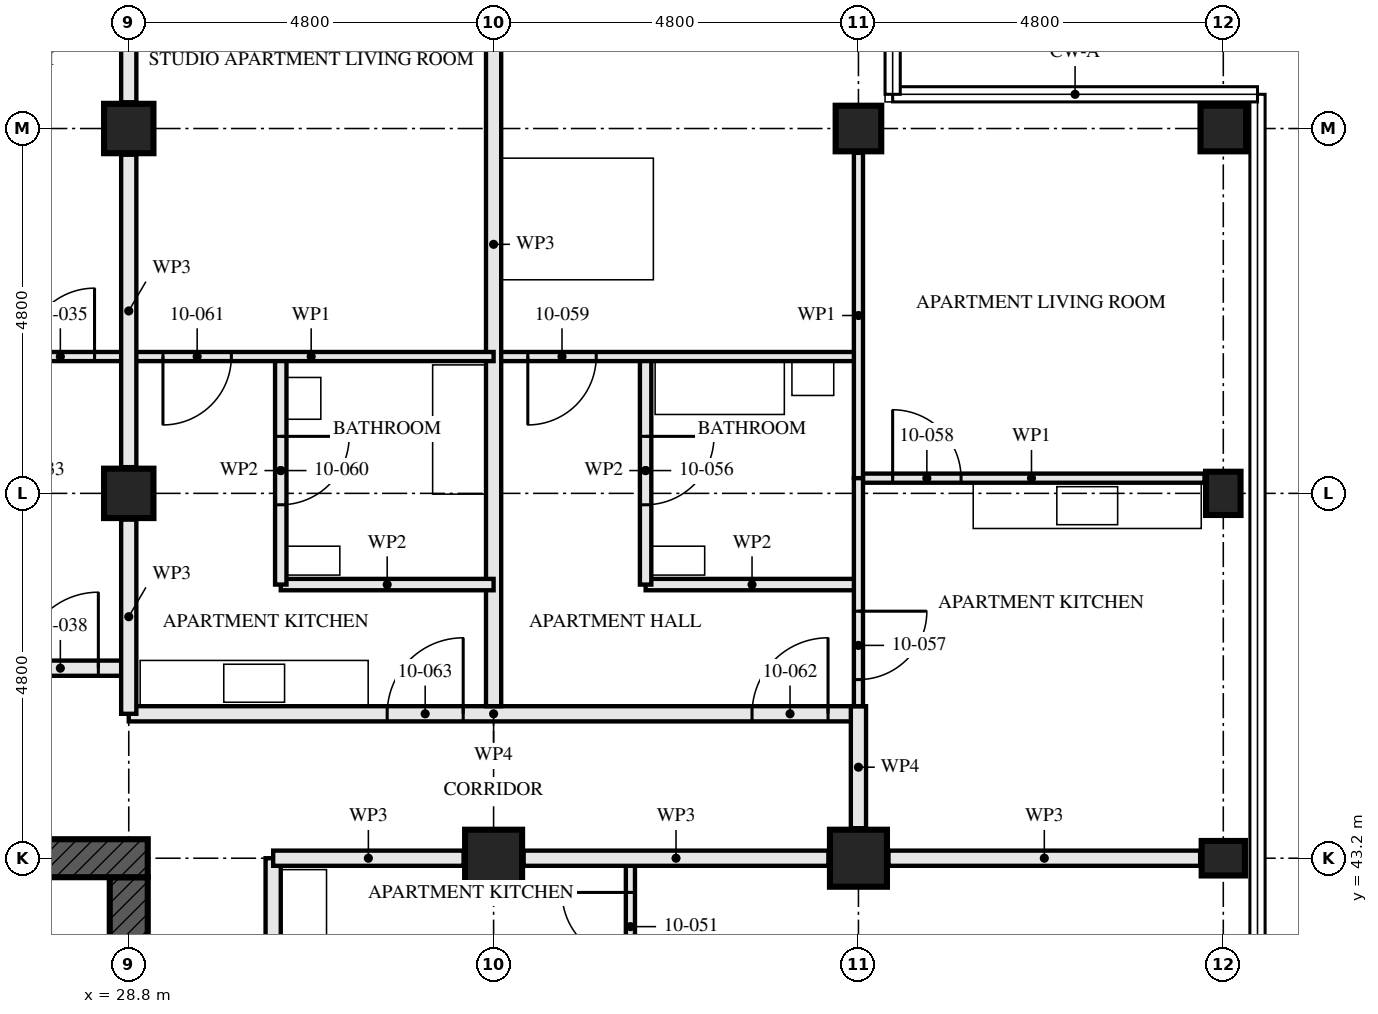
"""IFC4 building model, lengths in metres.
Left out: names, types, materials, properties, quantities, classifications, styles, units other than length and angle.
Written with IfcOpenShell. Run it as: python <this file> out.ifc"""

import sys

from ifc_helpers import new_model, si_unit, direction, frame, frame_2d, origin, origin_2d, place, context, subcontext, project, spatial, rectangle, hollow_rectangle, i_section, extrude, element, fill, save


model = new_model("IFC4")
c1 = context("Model", 3, precision=1e-05, world=origin(), true_north=direction((0.0, 1.0)))
c2 = subcontext(c1, "Body", "Model", "MODEL_VIEW")
j1 = project(units=[si_unit("LENGTHUNIT", "METRE"), si_unit("PLANEANGLEUNIT", "RADIAN")], contexts=[c1])
p1 = place(None, origin())
s1 = spatial("IfcSite", under=j1, at=p1, CompositionType="ELEMENT")
p2 = place(p1, origin())
s2 = spatial("IfcBuilding", under=s1, at=p2, CompositionType="ELEMENT")
p3 = place(p2, frame((0.0, 0.0, 41.0)))
s3 = spatial("IfcBuildingStorey", under=s2, at=p3, CompositionType="ELEMENT", Elevation=41.0)
for number, where, z_axis, x_axis in (
    (1, (28.8, 48.0, 0.0), (0.0, 0.0, 1.0), (1.0, 0.0, 0.0)),
    (2, (28.8, 52.8, 0.0), (0.0, 0.0, 1.0), (1.0, 0.0, 0.0)),
):
    element("IfcColumn", number, at=place(p3, frame(where, z_axis=z_axis, x_axis=x_axis)), inside=s3, PredefinedType="COLUMN", context=c2, shape_type="SweptSolid", body=[
        extrude(hollow_rectangle(XDim=0.65, YDim=0.65, WallThickness=0.05, at=origin_2d()), origin(), (0.0, 0.0, 1.0), 3.5),
    ])
for number, where, z_axis, x_axis in (
    (3, (33.6, 43.2, 0.0), (0.0, 0.0, 1.0), (0.0, 1.0, 0.0)),
    (4, (38.4, 43.2, 0.0), (0.0, 0.0, 1.0), (0.0, 1.0, 0.0)),
):
    element("IfcColumn", number, at=place(p3, frame(where, z_axis=z_axis, x_axis=x_axis)), inside=s3, PredefinedType="COLUMN", context=c2, shape_type="SweptSolid", body=[
        extrude(hollow_rectangle(XDim=0.75, YDim=0.75, WallThickness=0.08, at=origin_2d()), origin(), (0.0, 0.0, 1.0), 3.5),
    ])
p4 = place(p3, frame((38.4, 52.8, 0.0), z_axis=(0.0, 0.0, 1.0), x_axis=(0.0, 1.0, 0.0)))
e5 = element("IfcColumn", 5, at=p4, inside=s3, PredefinedType="COLUMN", context=c2, shape_type="SweptSolid", body=[
    extrude(hollow_rectangle(XDim=0.6, YDim=0.6, WallThickness=0.05, at=origin_2d()), origin(), (0.0, 0.0, 1.0), 3.5),
])
for number, where, z_axis, x_axis in (
    (6, (43.2, 43.2, 0.0), (0.0, 0.0, 1.0), (0.0, 1.0, 0.0)),
    (7, (43.2, 48.0, 0.0), (0.0, 0.0, 1.0), (1.0, 0.0, 0.0)),
):
    element("IfcColumn", number, at=place(p3, frame(where, z_axis=z_axis, x_axis=x_axis)), inside=s3, PredefinedType="COLUMN", context=c2, shape_type="SweptSolid", body=[
        extrude(i_section(OverallWidth=0.454, OverallDepth=0.569, WebThickness=0.078, FlangeThickness=0.125, FilletRadius=0.015, at=origin_2d()), origin(), (0.0, 0.0, 1.0), 3.5),
    ])
p5 = place(p3, frame((43.2, 52.8, 0.0), z_axis=(0.0, 0.0, 1.0), x_axis=(0.0, 1.0, 0.0)))
e8 = element("IfcColumn", 8, at=p5, inside=s3, PredefinedType="COLUMN", context=c2, shape_type="SweptSolid", body=[
    extrude(hollow_rectangle(XDim=0.6, YDim=0.6, WallThickness=0.05, at=origin_2d()), origin(), (0.0, 0.0, 1.0), 3.5),
])
p6 = place(p3, frame((29.05, 43.2, -0.17), z_axis=(0.0, 0.0, 1.0), x_axis=(-1.0, 0.0, 0.0)))
e9 = element("IfcWall", 9, at=p6, inside=s3, PredefinedType="SHEAR", context=c2, shape_type="SweptSolid", body=[
    extrude(rectangle(XDim=14.9, YDim=0.5, at=frame_2d((7.45, 0.0))), origin(), (0.0, 0.0, 1.0), 3.5),
])
p7 = place(p6, frame((6.85, 0.0, 0.17)))
e10 = element("IfcOpeningElement", 10, at=p7, cuts=e9, PredefinedType="OPENING", context=c2, shape_type="SweptSolid", body=[
    extrude(rectangle(XDim=1.2, YDim=2.1, at=frame_2d((0.6, 1.05))), frame((0.0, 0.26, 0.0), z_axis=(0.0, -1.0, 0.0), x_axis=(1.0, 0.0, 0.0)), (0.0, 0.0, 1.0), 0.521),
])
p8 = place(p3, frame((28.8, 29.05, -0.17), z_axis=(0.0, 0.0, 1.0), x_axis=(0.0, 1.0, 0.0)))
e11 = element("IfcWall", 11, at=p8, inside=s3, PredefinedType="SHEAR", context=c2, shape_type="SweptSolid", body=[
    extrude(rectangle(XDim=13.9, YDim=0.5, at=frame_2d((6.95, 0.0))), origin(), (0.0, 0.0, 1.0), 3.5),
])
p9 = place(p8, frame((6.35, 0.0, 0.17)))
e12 = element("IfcOpeningElement", 12, at=p9, cuts=e11, PredefinedType="OPENING", context=c2, shape_type="SweptSolid", body=[
    extrude(rectangle(XDim=1.2, YDim=2.1, at=frame_2d((0.6, 1.05))), frame((0.0, 0.26, 0.0), z_axis=(0.0, -1.0, 0.0), x_axis=(1.0, 0.0, 0.0)), (0.0, 0.0, 1.0), 0.521),
])
p10 = place(p3, frame((28.8, 49.8, 0.0), z_axis=(0.0, 0.0, 1.0), x_axis=(-1.0, 0.0, 0.0)))
e13 = element("IfcWall", 13, at=p10, inside=s3, PredefinedType="PARTITIONING", context=c2, shape_type="SweptSolid", body=[
    extrude(rectangle(XDim=4.8, YDim=0.12, at=frame_2d((2.4, 0.0))), origin(), (0.0, 0.0, 1.0), 3.33),
])
p11 = place(p10, frame((0.45, 0.0, 0.0)))
e14 = element("IfcOpeningElement", 14, at=p11, cuts=e13, PredefinedType="OPENING", context=c2, shape_type="SweptSolid", body=[
    extrude(rectangle(XDim=0.9, YDim=2.1, at=frame_2d((0.45, 1.05))), frame((0.0, 0.071, 0.0), z_axis=(0.0, -1.0, 0.0), x_axis=(1.0, 0.0, 0.0)), (0.0, 0.0, 1.0), 0.141),
])
p12 = place(p3, frame((28.8, 45.7, 0.0), z_axis=(0.0, 0.0, 1.0), x_axis=(-1.0, 0.0, 0.0)))
e15 = element("IfcWall", 15, at=p12, inside=s3, PredefinedType="PARTITIONING", context=c2, shape_type="SweptSolid", body=[
    extrude(rectangle(XDim=14.4, YDim=0.2, at=frame_2d((7.2, 0.0))), origin(), (0.0, 0.0, 1.0), 3.33),
])
p13 = place(p12, frame((0.4, 0.0, 0.0)))
e16 = element("IfcOpeningElement", 16, at=p13, cuts=e15, PredefinedType="OPENING", context=c2, shape_type="SweptSolid", body=[
    extrude(rectangle(XDim=1.0, YDim=2.1, at=frame_2d((0.5, 1.05))), frame((0.0, 0.111, 0.0), z_axis=(0.0, -1.0, 0.0), x_axis=(1.0, 0.0, 0.0)), (0.0, 0.0, 1.0), 0.221),
])
p14 = place(p3, frame((35.4, 38.4, 0.0), z_axis=(0.0, 0.0, 1.0), x_axis=(0.0, 1.0, 0.0)))
e17 = element("IfcWall", 17, at=p14, inside=s3, PredefinedType="PARTITIONING", context=c2, shape_type="SweptSolid", body=[
    extrude(rectangle(XDim=4.8, YDim=0.12, at=frame_2d((2.4, 0.0))), origin(), (0.0, 0.0, 1.0), 3.33),
])
p15 = place(p14, frame((3.45, 0.0, 0.0)))
e18 = element("IfcOpeningElement", 18, at=p15, cuts=e17, PredefinedType="OPENING", context=c2, shape_type="SweptSolid", body=[
    extrude(rectangle(XDim=0.9, YDim=2.1, at=frame_2d((0.45, 1.05))), frame((0.0, 0.071, 0.0), z_axis=(0.0, -1.0, 0.0), x_axis=(1.0, 0.0, 0.0)), (0.0, 0.0, 1.0), 0.141),
])
p16 = place(p3, frame((30.7, 28.8, 0.0), z_axis=(0.0, 0.0, 1.0), x_axis=(0.0, 1.0, 0.0)))
e19 = element("IfcWall", 19, at=p16, inside=s3, PredefinedType="PARTITIONING", context=c2, shape_type="SweptSolid", body=[
    extrude(rectangle(XDim=14.4, YDim=0.2, at=frame_2d((7.2, 0.0))), origin(), (0.0, 0.0, 1.0), 2.55),
])
p17 = place(p16, frame((1.4, 0.0, 0.0)))
e20 = element("IfcOpeningElement", 20, at=p17, cuts=e19, PredefinedType="OPENING", context=c2, shape_type="SweptSolid", body=[
    extrude(rectangle(XDim=1.0, YDim=2.1, at=frame_2d((0.5, 1.05))), frame((0.0, 0.111, 0.0), z_axis=(0.0, -1.0, 0.0), x_axis=(1.0, 0.0, 0.0)), (0.0, 0.0, 1.0), 0.221),
])
p18 = place(p16, frame((4.1, 0.0, 0.0)))
e21 = element("IfcOpeningElement", 21, at=p18, cuts=e19, PredefinedType="OPENING", context=c2, shape_type="SweptSolid", body=[
    extrude(rectangle(XDim=1.0, YDim=2.1, at=frame_2d((0.5, 1.05))), frame((0.0, 0.111, 0.0), z_axis=(0.0, -1.0, 0.0), x_axis=(1.0, 0.0, 0.0)), (0.0, 0.0, 1.0), 0.221),
])
p19 = place(p16, frame((5.975, 0.0, 0.0)))
e22 = element("IfcOpeningElement", 22, at=p19, cuts=e19, PredefinedType="OPENING", context=c2, shape_type="SweptSolid", body=[
    extrude(rectangle(XDim=1.0, YDim=2.1, at=frame_2d((0.5, 1.05))), frame((0.0, 0.111, 0.0), z_axis=(0.0, -1.0, 0.0), x_axis=(1.0, 0.0, 0.0)), (0.0, 0.0, 1.0), 0.221),
])
p20 = place(p16, frame((10.0, 0.0, 0.0)))
e23 = element("IfcOpeningElement", 23, at=p20, cuts=e19, PredefinedType="OPENING", context=c2, shape_type="SweptSolid", body=[
    extrude(rectangle(XDim=1.0, YDim=2.1, at=frame_2d((0.5, 1.05))), frame((0.0, 0.111, 0.0), z_axis=(0.0, -1.0, 0.0), x_axis=(1.0, 0.0, 0.0)), (0.0, 0.0, 1.0), 0.221),
])
p21 = place(p3, frame((35.6, 49.8, 0.0), z_axis=(0.0, 0.0, 1.0), x_axis=(0.0, -1.0, 0.0)))
e24 = element("IfcWall", 24, at=p21, inside=s3, PredefinedType="PARTITIONING", context=c2, shape_type="SweptSolid", body=[
    extrude(rectangle(XDim=3.0, YDim=0.15, at=frame_2d((1.5, 0.0))), origin(), (0.0, 0.0, 1.0), 2.55),
])
p22 = place(p21, frame((1.05, 0.0, 0.0)))
e25 = element("IfcOpeningElement", 25, at=p22, cuts=e24, PredefinedType="OPENING", context=c2, shape_type="SweptSolid", body=[
    extrude(rectangle(XDim=0.9, YDim=2.1, at=frame_2d((0.45, 1.05))), frame((0.0, 0.085, 0.0), z_axis=(0.0, -1.0, 0.0), x_axis=(1.0, 0.0, 0.0)), (0.0, 0.0, 1.0), 0.171),
])
p23 = place(p3, frame((38.4, 46.8, 0.0), z_axis=(0.0, 0.0, 1.0), x_axis=(-1.0, 0.0, 0.0)))
e26 = element("IfcWall", 26, at=p23, inside=s3, PredefinedType="PARTITIONING", context=c2, shape_type="SweptSolid", body=[
    extrude(rectangle(XDim=2.8, YDim=0.15, at=frame_2d((1.4, 0.0))), origin(), (0.0, 0.0, 1.0), 3.33),
])
p24 = place(p3, frame((38.4, 48.2, 0.0), z_axis=(0.0, 0.0, 1.0), x_axis=(0.0, -1.0, 0.0)))
e27 = element("IfcWall", 27, at=p24, inside=s3, PredefinedType="PARTITIONING", context=c2, shape_type="SweptSolid", body=[
    extrude(rectangle(XDim=3.0, YDim=0.12, at=frame_2d((1.5, 0.0))), origin(), (0.0, 0.0, 1.0), 2.55),
])
p25 = place(p24, frame((1.75, 0.0, 0.0)))
e28 = element("IfcOpeningElement", 28, at=p25, cuts=e27, PredefinedType="OPENING", context=c2, shape_type="SweptSolid", body=[
    extrude(rectangle(XDim=0.9, YDim=2.1, at=frame_2d((0.45, 1.05))), frame((0.0, 0.071, 0.0), z_axis=(0.0, -1.0, 0.0), x_axis=(1.0, 0.0, 0.0)), (0.0, 0.0, 1.0), 0.141),
])
p26 = place(p3, frame((42.953, 48.2, 0.0), z_axis=(0.0, 0.0, 1.0), x_axis=(-1.0, 0.0, 0.0)))
e29 = element("IfcWall", 29, at=p26, inside=s3, PredefinedType="PARTITIONING", context=c2, shape_type="SweptSolid", body=[
    extrude(rectangle(XDim=4.553, YDim=0.12, at=frame_2d((2.276, 0.0))), origin(), (0.0, 0.0, 1.0), 3.33),
])
p27 = place(p26, frame((3.203, 0.0, 0.0)))
e30 = element("IfcOpeningElement", 30, at=p27, cuts=e29, PredefinedType="OPENING", context=c2, shape_type="SweptSolid", body=[
    extrude(rectangle(XDim=0.9, YDim=2.1, at=frame_2d((0.45, 1.05))), frame((0.0, 0.071, 0.0), z_axis=(0.0, -1.0, 0.0), x_axis=(1.0, 0.0, 0.0)), (0.0, 0.0, 1.0), 0.141),
])
p28 = place(p3, frame((38.4, 49.8, 0.0), z_axis=(0.0, 0.0, 1.0), x_axis=(-1.0, 0.0, 0.0)))
e31 = element("IfcWall", 31, at=p28, inside=s3, PredefinedType="PARTITIONING", context=c2, shape_type="SweptSolid", body=[
    extrude(rectangle(XDim=4.8, YDim=0.12, at=frame_2d((2.4, 0.0))), origin(), (0.0, 0.0, 1.0), 3.33),
])
p29 = place(p28, frame((3.45, 0.0, 0.0)))
e32 = element("IfcOpeningElement", 32, at=p29, cuts=e31, PredefinedType="OPENING", context=c2, shape_type="SweptSolid", body=[
    extrude(rectangle(XDim=0.9, YDim=2.1, at=frame_2d((0.45, 1.05))), frame((0.0, 0.071, 0.0), z_axis=(0.0, -1.0, 0.0), x_axis=(1.0, 0.0, 0.0)), (0.0, 0.0, 1.0), 0.141),
])
p30 = place(p3, frame((38.4, 52.48, 0.0), z_axis=(0.0, 0.0, 1.0), x_axis=(0.0, -1.0, 0.0)))
e33 = element("IfcWall", 33, at=p30, inside=s3, PredefinedType="PARTITIONING", context=c2, shape_type="SweptSolid", body=[
    extrude(rectangle(XDim=4.28, YDim=0.12, at=frame_2d((2.14, 0.0))), origin(), (0.0, 0.0, 1.0), 3.33),
])
p31 = place(p3, frame((33.6, 57.353, 0.0), z_axis=(0.0, 0.0, 1.0), x_axis=(0.0, -1.0, 0.0)))
e34 = element("IfcWall", 34, at=p31, inside=s3, PredefinedType="PARTITIONING", context=c2, shape_type="SweptSolid", body=[
    extrude(rectangle(XDim=12.153, YDim=0.2, at=frame_2d((6.077, 0.0))), origin(), (0.0, 0.0, 1.0), 2.55),
])
p32 = place(p3, frame((30.8, 49.8, 0.0), z_axis=(0.0, 0.0, 1.0), x_axis=(0.0, -1.0, 0.0)))
e35 = element("IfcWall", 35, at=p32, inside=s3, PredefinedType="PARTITIONING", context=c2, shape_type="SweptSolid", body=[
    extrude(rectangle(XDim=3.0, YDim=0.15, at=frame_2d((1.5, 0.0))), origin(), (0.0, 0.0, 1.0), 2.55),
])
p33 = place(p32, frame((1.05, 0.0, 0.0)))
e36 = element("IfcOpeningElement", 36, at=p33, cuts=e35, PredefinedType="OPENING", context=c2, shape_type="SweptSolid", body=[
    extrude(rectangle(XDim=0.9, YDim=2.1, at=frame_2d((0.45, 1.05))), frame((0.0, 0.085, 0.0), z_axis=(0.0, -1.0, 0.0), x_axis=(1.0, 0.0, 0.0)), (0.0, 0.0, 1.0), 0.171),
])
p34 = place(p3, frame((33.6, 46.8, 0.0), z_axis=(0.0, 0.0, 1.0), x_axis=(-1.0, 0.0, 0.0)))
e37 = element("IfcWall", 37, at=p34, inside=s3, PredefinedType="PARTITIONING", context=c2, shape_type="SweptSolid", body=[
    extrude(rectangle(XDim=2.8, YDim=0.15, at=frame_2d((1.4, 0.0))), origin(), (0.0, 0.0, 1.0), 3.33),
])
p35 = place(p3, frame((33.6, 49.8, 0.0), z_axis=(0.0, 0.0, 1.0), x_axis=(-1.0, 0.0, 0.0)))
e38 = element("IfcWall", 38, at=p35, inside=s3, PredefinedType="PARTITIONING", context=c2, shape_type="SweptSolid", body=[
    extrude(rectangle(XDim=4.8, YDim=0.12, at=frame_2d((2.4, 0.0))), origin(), (0.0, 0.0, 1.0), 3.33),
])
p36 = place(p35, frame((3.45, 0.0, 0.0)))
e39 = element("IfcOpeningElement", 39, at=p36, cuts=e38, PredefinedType="OPENING", context=c2, shape_type="SweptSolid", body=[
    extrude(rectangle(XDim=0.9, YDim=2.1, at=frame_2d((0.45, 1.05))), frame((0.0, 0.071, 0.0), z_axis=(0.0, -1.0, 0.0), x_axis=(1.0, 0.0, 0.0)), (0.0, 0.0, 1.0), 0.141),
])
p37 = place(p3, frame((38.4, 45.1, 0.0), z_axis=(0.0, 0.0, 1.0), x_axis=(-1.0, 0.0, 0.0)))
e40 = element("IfcWall", 40, at=p37, inside=s3, PredefinedType="PARTITIONING", context=c2, shape_type="SweptSolid", body=[
    extrude(rectangle(XDim=9.6, YDim=0.2, at=frame_2d((4.8, 0.0))), origin(), (0.0, 0.0, 1.0), 3.33),
])
p38 = place(p37, frame((0.4, 0.0, 0.0)))
e41 = element("IfcOpeningElement", 41, at=p38, cuts=e40, PredefinedType="OPENING", context=c2, shape_type="SweptSolid", body=[
    extrude(rectangle(XDim=1.0, YDim=2.1, at=frame_2d((0.5, 1.05))), frame((0.0, 0.111, 0.0), z_axis=(0.0, -1.0, 0.0), x_axis=(1.0, 0.0, 0.0)), (0.0, 0.0, 1.0), 0.221),
])
p39 = place(p37, frame((5.2, 0.0, 0.0)))
e42 = element("IfcOpeningElement", 42, at=p39, cuts=e40, PredefinedType="OPENING", context=c2, shape_type="SweptSolid", body=[
    extrude(rectangle(XDim=1.0, YDim=2.1, at=frame_2d((0.5, 1.05))), frame((0.0, 0.111, 0.0), z_axis=(0.0, -1.0, 0.0), x_axis=(1.0, 0.0, 0.0)), (0.0, 0.0, 1.0), 0.221),
])
p40 = place(p3, frame((38.4, 45.2, 0.0), z_axis=(0.0, 0.0, 1.0), x_axis=(0.0, -1.0, 0.0)))
e43 = element("IfcWall", 43, at=p40, inside=s3, PredefinedType="PARTITIONING", context=c2, shape_type="SweptSolid", body=[
    extrude(rectangle(XDim=1.605, YDim=0.2, at=frame_2d((0.802, 0.0))), origin(), (0.0, 0.0, 1.0), 3.33),
])
p41 = place(p3, frame((28.8, 45.1, 0.0), z_axis=(0.0, 0.0, 1.0), x_axis=(0.0, 1.0, 0.0)))
e44 = element("IfcWall", 44, at=p41, inside=s3, PredefinedType="PARTITIONING", context=c2, shape_type="SweptSolid", body=[
    extrude(rectangle(XDim=2.555, YDim=0.2, at=frame_2d((1.277, 0.0))), origin(), (0.0, 0.0, 1.0), 2.32),
])
p42 = place(p3, frame((28.8, 48.345, 0.0), z_axis=(0.0, 0.0, 1.0), x_axis=(0.0, 1.0, 0.0)))
e45 = element("IfcWall", 45, at=p42, inside=s3, PredefinedType="PARTITIONING", context=c2, shape_type="SweptSolid", body=[
    extrude(rectangle(XDim=4.11, YDim=0.2, at=frame_2d((2.055, 0.0))), origin(), (0.0, 0.0, 1.0), 2.32),
])
p43 = place(p3, frame((28.8, 53.145, 0.0), z_axis=(0.0, 0.0, 1.0), x_axis=(0.0, 1.0, 0.0)))
e46 = element("IfcWall", 46, at=p43, inside=s3, PredefinedType="PARTITIONING", context=c2, shape_type="SweptSolid", body=[
    extrude(rectangle(XDim=4.208, YDim=0.2, at=frame_2d((2.104, 0.0))), origin(), (0.0, 0.0, 1.0), 2.32),
])
p44 = place(p3, frame((42.896, 43.2, 0.0), z_axis=(0.0, 0.0, 1.0), x_axis=(-1.0, 0.0, 0.0)))
e47 = element("IfcWall", 47, at=p44, inside=s3, PredefinedType="PARTITIONING", context=c2, shape_type="SweptSolid", body=[
    extrude(rectangle(XDim=4.101, YDim=0.2, at=frame_2d((2.05, 0.0))), origin(), (0.0, 0.0, 1.0), 2.32),
])
p45 = place(p3, frame((38.005, 43.2, 0.0), z_axis=(0.0, 0.0, 1.0), x_axis=(-1.0, 0.0, 0.0)))
e48 = element("IfcWall", 48, at=p45, inside=s3, PredefinedType="PARTITIONING", context=c2, shape_type="SweptSolid", body=[
    extrude(rectangle(XDim=4.01, YDim=0.2, at=frame_2d((2.005, 0.0))), origin(), (0.0, 0.0, 1.0), 2.32),
])
p46 = place(p3, frame((33.205, 43.2, 0.0), z_axis=(0.0, 0.0, 1.0), x_axis=(-1.0, 0.0, 0.0)))
e49 = element("IfcWall", 49, at=p46, inside=s3, PredefinedType="PARTITIONING", context=c2, shape_type="SweptSolid", body=[
    extrude(rectangle(XDim=2.505, YDim=0.2, at=frame_2d((1.252, 0.0))), origin(), (0.0, 0.0, 1.0), 2.32),
])
p47 = place(p11, frame((0.9, 0.0, 0.0), z_axis=(0.0, 0.0, 1.0), x_axis=(-1.0, 0.0, 0.0)))
e50 = element("IfcDoor", 50, at=p47, inside=s3, OperationType="SINGLE_SWING_LEFT", PredefinedType="DOOR", context=c2, shape_type="SweptSolid", body=[
    extrude(rectangle(XDim=0.9, YDim=2.1, at=frame_2d((0.45, 1.05))), frame((0.0, 0.022, 0.0), z_axis=(0.0, -1.0, 0.0), x_axis=(1.0, 0.0, 0.0)), (0.0, 0.0, 1.0), 0.044),
])
fill(e14, e50)
p48 = place(p13, frame((1.0, 0.0, 0.0), z_axis=(0.0, 0.0, 1.0), x_axis=(-1.0, 0.0, 0.0)))
e51 = element("IfcDoor", 51, at=p48, inside=s3, OperationType="SINGLE_SWING_LEFT", PredefinedType="DOOR", context=c2, shape_type="SweptSolid", body=[
    extrude(rectangle(XDim=1.0, YDim=2.1, at=frame_2d((0.5, 1.05))), frame((0.0, 0.027, 0.0), z_axis=(0.0, -1.0, 0.0), x_axis=(1.0, 0.0, 0.0)), (0.0, 0.0, 1.0), 0.054),
])
fill(e16, e51)
p49 = place(p15, origin())
e52 = element("IfcDoor", 52, at=p49, inside=s3, OperationType="SINGLE_SWING_LEFT", PredefinedType="DOOR", context=c2, shape_type="SweptSolid", body=[
    extrude(rectangle(XDim=0.9, YDim=2.1, at=frame_2d((0.45, 1.05))), frame((0.0, 0.022, 0.0), z_axis=(0.0, -1.0, 0.0), x_axis=(1.0, 0.0, 0.0)), (0.0, 0.0, 1.0), 0.044),
])
fill(e18, e52)
p50 = place(p22, origin())
e53 = element("IfcDoor", 53, at=p50, inside=s3, OperationType="SINGLE_SWING_RIGHT", PredefinedType="DOOR", context=c2, shape_type="SweptSolid", body=[
    extrude(rectangle(XDim=0.9, YDim=2.1, at=frame_2d((0.45, 1.05))), frame((0.0, 0.022, 0.0), z_axis=(0.0, -1.0, 0.0), x_axis=(1.0, 0.0, 0.0)), (0.0, 0.0, 1.0), 0.044),
])
fill(e25, e53)
p51 = place(p25, origin())
e54 = element("IfcDoor", 54, at=p51, inside=s3, OperationType="SINGLE_SWING_RIGHT", PredefinedType="DOOR", context=c2, shape_type="SweptSolid", body=[
    extrude(rectangle(XDim=0.9, YDim=2.1, at=frame_2d((0.45, 1.05))), frame((0.0, 0.022, 0.0), z_axis=(0.0, -1.0, 0.0), x_axis=(1.0, 0.0, 0.0)), (0.0, 0.0, 1.0), 0.044),
])
fill(e28, e54)
p52 = place(p27, frame((0.9, 0.0, 0.0), z_axis=(0.0, 0.0, 1.0), x_axis=(-1.0, 0.0, 0.0)))
e55 = element("IfcDoor", 55, at=p52, inside=s3, OperationType="SINGLE_SWING_RIGHT", PredefinedType="DOOR", context=c2, shape_type="SweptSolid", body=[
    extrude(rectangle(XDim=0.9, YDim=2.1, at=frame_2d((0.45, 1.05))), frame((0.0, 0.022, 0.0), z_axis=(0.0, -1.0, 0.0), x_axis=(1.0, 0.0, 0.0)), (0.0, 0.0, 1.0), 0.044),
])
fill(e30, e55)
p53 = place(p29, origin())
e56 = element("IfcDoor", 56, at=p53, inside=s3, OperationType="SINGLE_SWING_LEFT", PredefinedType="DOOR", context=c2, shape_type="SweptSolid", body=[
    extrude(rectangle(XDim=0.9, YDim=2.1, at=frame_2d((0.45, 1.05))), frame((0.0, 0.022, 0.0), z_axis=(0.0, -1.0, 0.0), x_axis=(1.0, 0.0, 0.0)), (0.0, 0.0, 1.0), 0.044),
])
fill(e32, e56)
p54 = place(p33, origin())
e57 = element("IfcDoor", 57, at=p54, inside=s3, OperationType="SINGLE_SWING_RIGHT", PredefinedType="DOOR", context=c2, shape_type="SweptSolid", body=[
    extrude(rectangle(XDim=0.9, YDim=2.1, at=frame_2d((0.45, 1.05))), frame((0.0, 0.022, 0.0), z_axis=(0.0, -1.0, 0.0), x_axis=(1.0, 0.0, 0.0)), (0.0, 0.0, 1.0), 0.044),
])
fill(e36, e57)
p55 = place(p36, origin())
e58 = element("IfcDoor", 58, at=p55, inside=s3, OperationType="SINGLE_SWING_LEFT", PredefinedType="DOOR", context=c2, shape_type="SweptSolid", body=[
    extrude(rectangle(XDim=0.9, YDim=2.1, at=frame_2d((0.45, 1.05))), frame((0.0, 0.022, 0.0), z_axis=(0.0, -1.0, 0.0), x_axis=(1.0, 0.0, 0.0)), (0.0, 0.0, 1.0), 0.044),
])
fill(e39, e58)
p56 = place(p38, frame((1.0, 0.0, 0.0), z_axis=(0.0, 0.0, 1.0), x_axis=(-1.0, 0.0, 0.0)))
e59 = element("IfcDoor", 59, at=p56, inside=s3, OperationType="SINGLE_SWING_LEFT", PredefinedType="DOOR", context=c2, shape_type="SweptSolid", body=[
    extrude(rectangle(XDim=1.0, YDim=2.1, at=frame_2d((0.5, 1.05))), frame((0.0, 0.027, 0.0), z_axis=(0.0, -1.0, 0.0), x_axis=(1.0, 0.0, 0.0)), (0.0, 0.0, 1.0), 0.054),
])
fill(e41, e59)
p57 = place(p39, frame((1.0, 0.0, 0.0), z_axis=(0.0, 0.0, 1.0), x_axis=(-1.0, 0.0, 0.0)))
e60 = element("IfcDoor", 60, at=p57, inside=s3, OperationType="SINGLE_SWING_LEFT", PredefinedType="DOOR", context=c2, shape_type="SweptSolid", body=[
    extrude(rectangle(XDim=1.0, YDim=2.1, at=frame_2d((0.5, 1.05))), frame((0.0, 0.027, 0.0), z_axis=(0.0, -1.0, 0.0), x_axis=(1.0, 0.0, 0.0)), (0.0, 0.0, 1.0), 0.054),
])
fill(e42, e60)
save(model, sys.argv[1])
